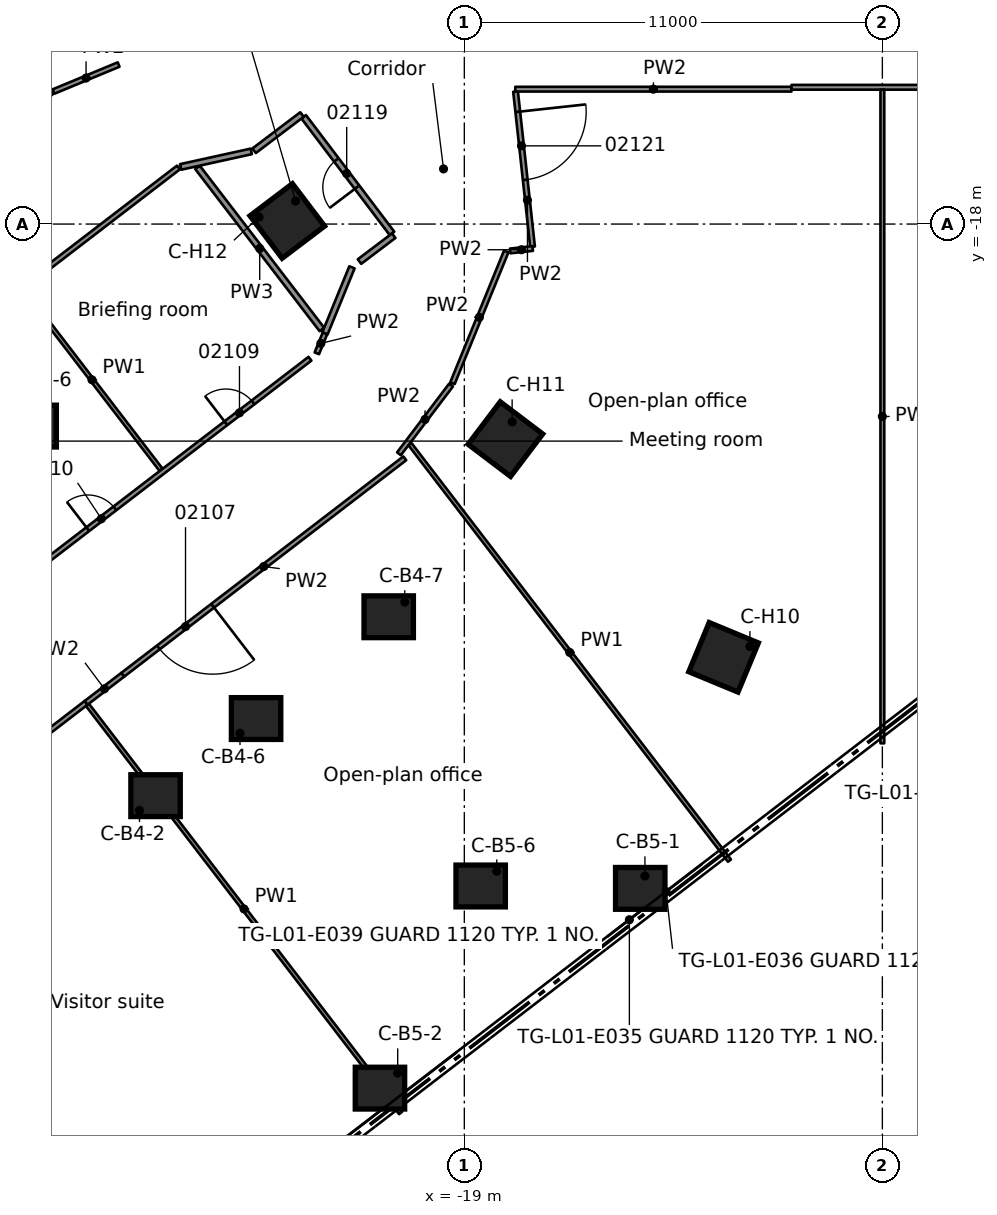
"""IFC4 building model, lengths in metres.
Left out: names, types, materials, properties, quantities, classifications, styles, units other than length and angle.
Written with IfcOpenShell. Run it as: python <this file> out.ifc"""

import sys

from ifc_helpers import new_model, si_unit, direction, frame, frame_2d, origin, origin_2d, place, context, subcontext, project, spatial, rectangle, extrude, element, fill, save


model = new_model("IFC4")
c1 = context("Model", 3, precision=1e-05, world=origin(), true_north=direction((0.0, 1.0)))
c2 = subcontext(c1, "Body", "Model", "MODEL_VIEW")
j1 = project(units=[si_unit("LENGTHUNIT", "METRE"), si_unit("PLANEANGLEUNIT", "RADIAN")], contexts=[c1])
p1 = place(None, origin())
s1 = spatial("IfcSite", under=j1, at=p1, CompositionType="ELEMENT")
p2 = place(p1, origin())
s2 = spatial("IfcBuilding", under=s1, at=p2, CompositionType="ELEMENT")
p3 = place(p2, frame((0.0, 0.0, 10.5)))
s3 = spatial("IfcBuildingStorey", under=s2, at=p3, CompositionType="ELEMENT", Elevation=10.5)
for number, where, z_axis, x_axis in (
    (1, (-30.385, -23.316, -1.0), (0.0, 0.0, 1.0), (0.707, 0.707, 0.0)),
    (2, (-27.125, -33.04, -1.0), (0.0, 0.0, 1.0), (0.707, 0.707, 0.0)),
    (3, (-24.48, -31.011, -1.0), (0.0, 0.0, 1.0), (0.707, 0.707, 0.0)),
):
    element("IfcColumn", number, at=place(p3, frame(where, z_axis=z_axis, x_axis=x_axis)), inside=s3, PredefinedType="COLUMN", context=c2, shape_type="SweptSolid", body=[
        extrude(rectangle(XDim=3.25, YDim=3.25, at=origin_2d()), origin(), (0.0, 0.0, 1.0), 1.0),
    ])
p4 = place(p3, frame((-20.99, -28.333, -1.0), z_axis=(0.0, 0.0, 1.0), x_axis=(0.707106781187, 0.707106781187, 0.0)))
e4 = element("IfcColumn", 4, at=p4, inside=s3, PredefinedType="COLUMN", context=c2, shape_type="SweptSolid", body=[
    extrude(rectangle(XDim=3.4, YDim=3.4, at=origin_2d()), origin(), (0.0, 0.0, 1.0), 1.0),
])
p5 = place(p3, frame((-14.371, -35.48, -1.0), z_axis=(0.0, 0.0, 1.0), x_axis=(0.707106781187, 0.707106781187, 0.0)))
e5 = element("IfcColumn", 5, at=p5, inside=s3, PredefinedType="COLUMN", context=c2, shape_type="SweptSolid", body=[
    extrude(rectangle(XDim=2.95, YDim=2.95, at=origin_2d()), origin(), (0.0, 0.0, 1.0), 1.0),
])
p6 = place(p3, frame((-21.22, -40.736, -1.0), z_axis=(0.0, 0.0, 1.0), x_axis=(0.707106781187, 0.707106781187, 0.0)))
e6 = element("IfcColumn", 6, at=p6, inside=s3, PredefinedType="COLUMN", context=c2, shape_type="SweptSolid", body=[
    extrude(rectangle(XDim=3.4, YDim=3.4, at=origin_2d()), origin(), (0.0, 0.0, 1.0), 1.0),
])
p7 = place(p3, frame((-18.57, -35.417, -1.0), z_axis=(0.0, 0.0, 1.0), x_axis=(0.707106781187, 0.707106781187, 0.0)))
e7 = element("IfcColumn", 7, at=p7, inside=s3, PredefinedType="COLUMN", context=c2, shape_type="SweptSolid", body=[
    extrude(rectangle(XDim=2.95, YDim=2.95, at=origin_2d()), origin(), (0.0, 0.0, 1.0), 1.0),
])
for number, where, z_axis, x_axis in (
    (8, (-12.178, -29.4, -1.0), (0.0, 0.0, 1.0), (0.707, 0.707, 0.0)),
    (9, (-17.919, -23.659, -1.0), (0.0, 0.0, 1.0), (0.707, 0.707, 0.0)),
    (10, (-23.659, -17.919, -1.0), (0.0, 0.0, 1.0), (0.707, 0.707, 0.0)),
    (11, (-29.4, -12.178, -1.0), (0.0, 0.0, 1.0), (0.707, 0.707, 0.0)),
):
    element("IfcColumn", number, at=place(p3, frame(where, z_axis=z_axis, x_axis=x_axis)), inside=s3, PredefinedType="COLUMN", context=c2, shape_type="SweptSolid", body=[
        extrude(rectangle(XDim=3.4, YDim=3.4, at=origin_2d()), origin(), (0.0, 0.0, 1.0), 1.0),
    ])
for number, where, z_axis, x_axis in (
    (12, (-30.385, -23.316, 0.0), (0.0, 0.0, 1.0), (1.0, 0.0, 0.0)),
    (13, (-27.125, -33.04, 0.0), (0.0, 0.0, 1.0), (1.0, 0.0, 0.0)),
    (14, (-24.48, -31.011, 0.0), (0.0, 0.0, 1.0), (1.0, 0.0, 0.0)),
    (15, (-20.99, -28.333, 0.0), (0.0, 0.0, 1.0), (1.0, 0.0, 0.0)),
    (16, (-14.371, -35.48, 0.0), (0.0, 0.0, 1.0), (1.0, 0.0, 0.0)),
    (17, (-21.22, -40.736, 0.0), (0.0, 0.0, 1.0), (1.0, 0.0, 0.0)),
    (18, (-18.57, -35.417, 0.0), (0.0, 0.0, 1.0), (1.0, 0.0, 0.0)),
):
    element("IfcColumn", number, at=place(p3, frame(where, z_axis=z_axis, x_axis=x_axis)), inside=s3, PredefinedType="COLUMN", context=c2, shape_type="SweptSolid", body=[
        extrude(rectangle(XDim=1.3, YDim=1.1, at=origin_2d()), origin(), (0.0, 0.0, 1.0), 5.0),
    ])
for number, where, z_axis, x_axis in (
    (19, (-12.178, -29.4, 0.0), (0.0, 0.0, 1.0), (-0.383, -0.924, 0.0)),
    (20, (-17.919, -23.659, 0.0), (0.0, 0.0, 1.0), (-0.604, -0.797, 0.0)),
    (21, (-23.659, -17.919, 0.0), (0.0, 0.0, 1.0), (-0.797, -0.604, 0.0)),
):
    element("IfcColumn", number, at=place(p3, frame(where, z_axis=z_axis, x_axis=x_axis)), inside=s3, PredefinedType="COLUMN", context=c2, shape_type="SweptSolid", body=[
        extrude(rectangle(XDim=1.4, YDim=1.4, at=origin_2d()), origin(), (0.0, 0.0, 1.0), 5.0),
    ])
p8 = place(p3, frame((-17.652, -14.513, 0.0), z_axis=(0.0, 0.0, 1.0), x_axis=(0.108833050521, -0.994060042007, 0.0)))
e22 = element("IfcWall", 22, at=p8, inside=s3, PredefinedType="PARTITIONING", context=c2, shape_type="SweptSolid", body=[
    extrude(rectangle(XDim=4.107, YDim=0.125, at=frame_2d((2.054, 0.0))), origin(), (0.0, 0.0, 1.0), 4.58),
])
p9 = place(p8, frame((0.538, 0.0, 0.0)))
e23 = element("IfcOpeningElement", 23, at=p9, cuts=e22, PredefinedType="OPENING", context=c2, shape_type="SweptSolid", body=[
    extrude(rectangle(XDim=1.8, YDim=2.1, at=frame_2d((0.9, 1.05))), frame((0.0, 0.073, 0.0), z_axis=(0.0, -1.0, 0.0), x_axis=(1.0, 0.0, 0.0)), (0.0, 0.0, 1.0), 0.145),
])
p10 = place(p3, frame((-20.903, -18.246, 0.0), z_axis=(0.0, 0.0, 1.0), x_axis=(-0.603799066409, 0.797136555054, 0.0)))
e24 = element("IfcWall", 24, at=p10, inside=s3, PredefinedType="PARTITIONING", context=c2, shape_type="SweptSolid", body=[
    extrude(rectangle(XDim=3.849, YDim=0.15, at=frame_2d((1.924, 0.0))), origin(), (0.0, 0.0, 1.0), 4.58),
])
p11 = place(p10, frame((1.525, 0.0, 0.0)))
e25 = element("IfcOpeningElement", 25, at=p11, cuts=e24, PredefinedType="OPENING", context=c2, shape_type="SweptSolid", body=[
    extrude(rectangle(XDim=0.9, YDim=2.1, at=frame_2d((0.45, 1.05))), frame((0.0, 0.085, 0.0), z_axis=(0.0, -1.0, 0.0), x_axis=(1.0, 0.0, 0.0)), (0.0, 0.0, 1.0), 0.17),
])
p12 = place(p3, frame((-35.819, -35.947, 0.0), z_axis=(0.0, 0.0, 1.0), x_axis=(0.608745897366, -0.793365257898, 0.0)))
e26 = element("IfcWall", 26, at=p12, inside=s3, PredefinedType="PARTITIONING", context=c2, shape_type="SweptSolid", body=[
    extrude(rectangle(XDim=13.482, YDim=0.1, at=frame_2d((6.741, 0.0))), origin(), (0.0, 0.0, 1.0), 4.58),
])
p13 = place(p3, frame((-28.917, -30.652, 0.0), z_axis=(0.0, 0.0, 1.0), x_axis=(0.608788953199, -0.793332219478, 0.0)))
e27 = element("IfcWall", 27, at=p13, inside=s3, PredefinedType="PARTITIONING", context=c2, shape_type="SweptSolid", body=[
    extrude(rectangle(XDim=13.535, YDim=0.1, at=frame_2d((6.768, 0.0))), origin(), (0.0, 0.0, 1.0), 4.58),
])
p14 = place(p3, frame((-30.617, -19.729, 0.0), z_axis=(0.0, 0.0, 1.0), x_axis=(0.608902533452, -0.793245047104, 0.0)))
e28 = element("IfcWall", 28, at=p14, inside=s3, PredefinedType="PARTITIONING", context=c2, shape_type="SweptSolid", body=[
    extrude(rectangle(XDim=5.973, YDim=0.1, at=frame_2d((2.986, 0.0))), origin(), (0.0, 0.0, 1.0), 4.58),
])
p15 = place(p3, frame((-26.021, -16.509, 0.0), z_axis=(0.0, 0.0, 1.0), x_axis=(0.608806156611, -0.793319017592, 0.0)))
e29 = element("IfcWall", 29, at=p15, inside=s3, PredefinedType="PARTITIONING", context=c2, shape_type="SweptSolid", body=[
    extrude(rectangle(XDim=5.376, YDim=0.15, at=frame_2d((2.688, 0.0))), origin(), (0.0, 0.0, 1.0), 4.58),
])
p16 = place(p3, frame((-20.431, -23.791, 0.0), z_axis=(0.0, 0.0, 1.0), x_axis=(0.608708319694, -0.793394089678, 0.0)))
e30 = element("IfcWall", 30, at=p16, inside=s3, PredefinedType="PARTITIONING", context=c2, shape_type="SweptSolid", body=[
    extrude(rectangle(XDim=13.813, YDim=0.1, at=frame_2d((6.906, 0.0))), origin(), (0.0, 0.0, 1.0), 4.58),
])
p17 = place(p3, frame((-17.659, -14.451, 0.0), z_axis=(0.0, 0.0, 1.0), x_axis=(1.0, 0.0, 0.0)))
e31 = element("IfcWall", 31, at=p17, inside=s3, PredefinedType="PARTITIONING", context=c2, shape_type="SweptSolid", body=[
    extrude(rectangle(XDim=7.268, YDim=0.125, at=frame_2d((3.634, 0.0))), origin(), (0.0, 0.0, 1.0), 4.58),
])
p18 = place(p3, frame((10.391, -14.401, 0.0), z_axis=(0.0, 0.0, 1.0), x_axis=(-1.0, 0.0, 0.0)))
e32 = element("IfcWall", 32, at=p18, inside=s3, PredefinedType="PARTITIONING", context=c2, shape_type="SweptSolid", body=[
    extrude(rectangle(XDim=20.781, YDim=0.125, at=frame_2d((10.391, 0.0))), origin(), (0.0, 0.0, 1.0), 4.58),
])
p19 = place(p18, frame((13.491, 0.0, 0.0)))
e33 = element("IfcOpeningElement", 33, at=p19, cuts=e32, PredefinedType="OPENING", context=c2, shape_type="SweptSolid", body=[
    extrude(rectangle(XDim=1.8, YDim=2.1, at=frame_2d((0.9, 1.05))), frame((0.0, 0.073, 0.0), z_axis=(0.0, -1.0, 0.0), x_axis=(1.0, 0.0, 0.0)), (0.0, 0.0, 1.0), 0.145),
])
p20 = place(p18, frame((5.491, 0.0, 0.0)))
e34 = element("IfcOpeningElement", 34, at=p20, cuts=e32, PredefinedType="OPENING", context=c2, shape_type="SweptSolid", body=[
    extrude(rectangle(XDim=1.8, YDim=2.1, at=frame_2d((0.9, 1.05))), frame((0.0, 0.073, 0.0), z_axis=(0.0, -1.0, 0.0), x_axis=(1.0, 0.0, 0.0)), (0.0, 0.0, 1.0), 0.145),
])
p21 = place(p3, frame((-17.793, -18.708, 0.0), z_axis=(0.0, 0.0, 1.0), x_axis=(0.994037722998, 0.109036715182, 0.0)))
e35 = element("IfcWall", 35, at=p21, inside=s3, PredefinedType="PARTITIONING", context=c2, shape_type="SweptSolid", body=[
    extrude(rectangle(XDim=0.596, YDim=0.125, at=frame_2d((0.298, 0.0))), origin(), (0.0, 0.0, 1.0), 4.58),
])
p22 = place(p3, frame((-26.464, -16.497, 0.0), z_axis=(0.0, 0.0, 1.0), x_axis=(0.976601904513, 0.215055155954, 0.0)))
e36 = element("IfcWall", 36, at=p22, inside=s3, PredefinedType="PARTITIONING", context=c2, shape_type="SweptSolid", body=[
    extrude(rectangle(XDim=1.903, YDim=0.15, at=frame_2d((0.951, 0.0))), origin(), (0.0, 0.0, 1.0), 4.58),
])
p23 = place(p3, frame((-29.81, -14.513, 0.0), z_axis=(0.0, 0.0, 1.0), x_axis=(0.923811400228, 0.382847876851, 0.0)))
e37 = element("IfcWall", 37, at=p23, inside=s3, PredefinedType="PARTITIONING", context=c2, shape_type="SweptSolid", body=[
    extrude(rectangle(XDim=1.854, YDim=0.125, at=frame_2d((0.927, 0.0))), origin(), (0.0, 0.0, 1.0), 4.58),
])
p24 = place(p3, frame((-21.758, -18.987, 0.0), z_axis=(0.0, 0.0, 1.0), x_axis=(0.797423261737, 0.603420368931, 0.0)))
e38 = element("IfcWall", 38, at=p24, inside=s3, PredefinedType="PARTITIONING", context=c2, shape_type="SweptSolid", body=[
    extrude(rectangle(XDim=1.129, YDim=0.15, at=frame_2d((0.564, 0.0))), origin(), (0.0, 0.0, 1.0), 4.58),
])
p25 = place(p3, frame((-24.532, -16.072, 0.0), z_axis=(0.0, 0.0, 1.0), x_axis=(0.797229566058, 0.603676253469, 0.0)))
e39 = element("IfcWall", 39, at=p25, inside=s3, PredefinedType="PARTITIONING", context=c2, shape_type="SweptSolid", body=[
    extrude(rectangle(XDim=1.581, YDim=0.15, at=frame_2d((0.79, 0.0))), origin(), (0.0, 0.0, 1.0), 4.58),
])
p26 = place(p3, frame((-28.955, -30.6, 0.0), z_axis=(0.0, 0.0, 1.0), x_axis=(0.793590253862, 0.608452552772, 0.0)))
e40 = element("IfcWall", 40, at=p26, inside=s3, PredefinedType="PARTITIONING", context=c2, shape_type="SweptSolid", body=[
    extrude(rectangle(XDim=1.22, YDim=0.125, at=frame_2d((0.61, 0.0))), origin(), (0.0, 0.0, 1.0), 4.58),
])
p27 = place(p3, frame((-28.955, -30.6, 0.0), z_axis=(0.0, 0.0, 1.0), x_axis=(-0.793294727074, -0.608837807627, 0.0)))
e41 = element("IfcWall", 41, at=p27, inside=s3, PredefinedType="PARTITIONING", context=c2, shape_type="SweptSolid", body=[
    extrude(rectangle(XDim=13.9, YDim=0.125, at=frame_2d((6.95, 0.0))), origin(), (0.0, 0.0, 1.0), 4.58),
])
p28 = place(p27, frame((3.851, 0.0, 0.0)))
e42 = element("IfcOpeningElement", 42, at=p28, cuts=e41, PredefinedType="OPENING", context=c2, shape_type="SweptSolid", body=[
    extrude(rectangle(XDim=0.9, YDim=2.1, at=frame_2d((0.45, 1.05))), frame((0.0, 0.073, 0.0), z_axis=(0.0, -1.0, 0.0), x_axis=(1.0, 0.0, 0.0)), (0.0, 0.0, 1.0), 0.145),
])
p29 = place(p27, frame((10.801, 0.0, 0.0)))
e43 = element("IfcOpeningElement", 43, at=p29, cuts=e41, PredefinedType="OPENING", context=c2, shape_type="SweptSolid", body=[
    extrude(rectangle(XDim=0.9, YDim=2.1, at=frame_2d((0.45, 1.05))), frame((0.0, 0.073, 0.0), z_axis=(0.0, -1.0, 0.0), x_axis=(1.0, 0.0, 0.0)), (0.0, 0.0, 1.0), 0.145),
])
p30 = place(p3, frame((-20.567, -24.164, 0.0), z_axis=(0.0, 0.0, 1.0), x_axis=(-0.793345387212, -0.608771793523, 0.0)))
e44 = element("IfcWall", 44, at=p30, inside=s3, PredefinedType="PARTITIONING", context=c2, shape_type="SweptSolid", body=[
    extrude(rectangle(XDim=9.353, YDim=0.125, at=frame_2d((4.677, 0.0))), origin(), (0.0, 0.0, 1.0), 4.58),
])
p31 = place(p30, frame((6.373, 0.0, 0.0)))
e45 = element("IfcOpeningElement", 45, at=p31, cuts=e44, PredefinedType="OPENING", context=c2, shape_type="SweptSolid", body=[
    extrude(rectangle(XDim=1.8, YDim=2.1, at=frame_2d((0.9, 1.05))), frame((0.0, 0.073, 0.0), z_axis=(0.0, -1.0, 0.0), x_axis=(1.0, 0.0, 0.0)), (0.0, 0.0, 1.0), 0.145),
])
p32 = place(p3, frame((-39.556, -34.196, 0.0), z_axis=(0.0, 0.0, 1.0), x_axis=(0.793448872505, 0.608636908773, 0.0)))
e46 = element("IfcWall", 46, at=p32, inside=s3, PredefinedType="PARTITIONING", context=c2, shape_type="SweptSolid", body=[
    extrude(rectangle(XDim=20.788, YDim=0.125, at=frame_2d((10.394, 0.0))), origin(), (0.0, 0.0, 1.0), 4.58),
])
p33 = place(p32, frame((18.0, 0.0, 0.0)))
e47 = element("IfcOpeningElement", 47, at=p33, cuts=e46, PredefinedType="OPENING", context=c2, shape_type="SweptSolid", body=[
    extrude(rectangle(XDim=0.9, YDim=2.1, at=frame_2d((0.45, 1.05))), frame((0.0, 0.073, 0.0), z_axis=(0.0, -1.0, 0.0), x_axis=(1.0, 0.0, 0.0)), (0.0, 0.0, 1.0), 0.145),
])
p34 = place(p32, frame((13.419, 0.0, 0.0)))
e48 = element("IfcOpeningElement", 48, at=p34, cuts=e46, PredefinedType="OPENING", context=c2, shape_type="SweptSolid", body=[
    extrude(rectangle(XDim=0.9, YDim=2.1, at=frame_2d((0.45, 1.05))), frame((0.0, 0.073, 0.0), z_axis=(0.0, -1.0, 0.0), x_axis=(1.0, 0.0, 0.0)), (0.0, 0.0, 1.0), 0.145),
])
p35 = place(p32, frame((5.749, 0.0, 0.0)))
e49 = element("IfcOpeningElement", 49, at=p35, cuts=e46, PredefinedType="OPENING", context=c2, shape_type="SweptSolid", body=[
    extrude(rectangle(XDim=0.9, YDim=2.1, at=frame_2d((0.45, 1.05))), frame((0.0, 0.073, 0.0), z_axis=(0.0, -1.0, 0.0), x_axis=(1.0, 0.0, 0.0)), (0.0, 0.0, 1.0), 0.145),
])
p36 = place(p3, frame((-43.269, -29.358, 0.0), z_axis=(0.0, 0.0, 1.0), x_axis=(0.793439885471, 0.608648624531, 0.0)))
e50 = element("IfcWall", 50, at=p36, inside=s3, PredefinedType="PARTITIONING", context=c2, shape_type="SweptSolid", body=[
    extrude(rectangle(XDim=21.106, YDim=0.125, at=frame_2d((10.553, 0.0))), origin(), (0.0, 0.0, 1.0), 4.58),
])
p37 = place(p3, frame((-36.084, -19.305, 0.0), z_axis=(0.0, 0.0, 1.0), x_axis=(0.793472416576, 0.60860621434, 0.0)))
e51 = element("IfcWall", 51, at=p37, inside=s3, PredefinedType="PARTITIONING", context=c2, shape_type="SweptSolid", body=[
    extrude(rectangle(XDim=7.834, YDim=0.125, at=frame_2d((3.917, 0.0))), origin(), (0.0, 0.0, 1.0), 4.58),
])
p38 = place(p37, frame((1.6, 0.0, 0.0)))
e52 = element("IfcOpeningElement", 52, at=p38, cuts=e51, PredefinedType="OPENING", context=c2, shape_type="SweptSolid", body=[
    extrude(rectangle(XDim=0.9, YDim=2.1, at=frame_2d((0.45, 1.05))), frame((0.0, 0.073, 0.0), z_axis=(0.0, -1.0, 0.0), x_axis=(1.0, 0.0, 0.0)), (0.0, 0.0, 1.0), 0.145),
])
p39 = place(p3, frame((-19.35, -22.237, 0.0), z_axis=(0.0, 0.0, 1.0), x_axis=(-0.603936432713, -0.797032486943, 0.0)))
e53 = element("IfcWall", 53, at=p39, inside=s3, PredefinedType="PARTITIONING", context=c2, shape_type="SweptSolid", body=[
    extrude(rectangle(XDim=2.268, YDim=0.125, at=frame_2d((1.134, 0.0))), origin(), (0.0, 0.0, 1.0), 4.58),
])
p40 = place(p3, frame((-19.312, -22.187, 0.0), z_axis=(0.0, 0.0, 1.0), x_axis=(0.377878748859, 0.925855091881, 0.0)))
e54 = element("IfcWall", 54, at=p40, inside=s3, PredefinedType="PARTITIONING", context=c2, shape_type="SweptSolid", body=[
    extrude(rectangle(XDim=3.745, YDim=0.125, at=frame_2d((1.872, 0.0))), origin(), (0.0, 0.0, 1.0), 4.58),
])
p41 = place(p3, frame((-22.668, -20.878, 0.0), z_axis=(0.0, 0.0, 1.0), x_axis=(0.378415254767, 0.925635940832, 0.0)))
e55 = element("IfcWall", 55, at=p41, inside=s3, PredefinedType="PARTITIONING", context=c2, shape_type="SweptSolid", body=[
    extrude(rectangle(XDim=1.879, YDim=0.15, at=frame_2d((0.939, 0.0))), origin(), (0.0, 0.0, 1.0), 4.58),
])
p42 = place(p3, frame((-22.881, -21.401, 0.0), z_axis=(0.0, 0.0, 1.0), x_axis=(0.377420478288, 0.926041998275, 0.0)))
e56 = element("IfcWall", 56, at=p42, inside=s3, PredefinedType="PARTITIONING", context=c2, shape_type="SweptSolid", body=[
    extrude(rectangle(XDim=0.565, YDim=0.125, at=frame_2d((0.282, 0.0))), origin(), (0.0, 0.0, 1.0), 4.58),
])
p43 = place(p3, frame((-8.0, -31.663, 0.0), z_axis=(0.0, 0.0, 1.0), x_axis=(0.0, 1.0, 0.0)))
e57 = element("IfcWall", 57, at=p43, inside=s3, PredefinedType="PARTITIONING", context=c2, shape_type="SweptSolid", body=[
    extrude(rectangle(XDim=17.2, YDim=0.1, at=frame_2d((8.6, 0.0))), origin(), (0.0, 0.0, 1.0), 4.58),
])
p44 = place(p31, origin())
e58 = element("IfcDoor", 58, at=p44, inside=s3, OperationType="DOUBLE_DOOR_SINGLE_SWING", PredefinedType="DOOR", context=c2, shape_type="SweptSolid", body=[
    extrude(rectangle(XDim=1.8, YDim=2.1, at=frame_2d((0.9, 1.05))), frame((0.0, 0.025, 0.0), z_axis=(0.0, -1.0, 0.0), x_axis=(1.0, 0.0, 0.0)), (0.0, 0.0, 1.0), 0.05),
])
fill(e45, e58)
p45 = place(p33, origin())
e59 = element("IfcDoor", 59, at=p45, inside=s3, OperationType="SINGLE_SWING_RIGHT", PredefinedType="DOOR", context=c2, shape_type="SweptSolid", body=[
    extrude(rectangle(XDim=0.9, YDim=2.1, at=frame_2d((0.45, 1.05))), frame((0.0, 0.025, 0.0), z_axis=(0.0, -1.0, 0.0), x_axis=(1.0, 0.0, 0.0)), (0.0, 0.0, 1.0), 0.05),
])
fill(e47, e59)
p46 = place(p34, origin())
e60 = element("IfcDoor", 60, at=p46, inside=s3, OperationType="SINGLE_SWING_RIGHT", PredefinedType="DOOR", context=c2, shape_type="SweptSolid", body=[
    extrude(rectangle(XDim=0.9, YDim=2.1, at=frame_2d((0.45, 1.05))), frame((0.0, 0.025, 0.0), z_axis=(0.0, -1.0, 0.0), x_axis=(1.0, 0.0, 0.0)), (0.0, 0.0, 1.0), 0.05),
])
fill(e48, e60)
p47 = place(p11, origin())
e61 = element("IfcDoor", 61, at=p47, inside=s3, OperationType="SINGLE_SWING_RIGHT", PredefinedType="DOOR", context=c2, shape_type="SweptSolid", body=[
    extrude(rectangle(XDim=0.9, YDim=2.1, at=frame_2d((0.45, 1.05))), frame((0.0, 0.025, 0.0), z_axis=(0.0, -1.0, 0.0), x_axis=(1.0, 0.0, 0.0)), (0.0, 0.0, 1.0), 0.05),
])
fill(e25, e61)
p48 = place(p9, origin())
e62 = element("IfcDoor", 62, at=p48, inside=s3, OperationType="DOUBLE_DOOR_SINGLE_SWING", PredefinedType="DOOR", context=c2, shape_type="SweptSolid", body=[
    extrude(rectangle(XDim=1.8, YDim=2.1, at=frame_2d((0.9, 1.05))), frame((0.0, 0.025, 0.0), z_axis=(0.0, -1.0, 0.0), x_axis=(1.0, 0.0, 0.0)), (0.0, 0.0, 1.0), 0.05),
])
fill(e23, e62)
save(model, sys.argv[1])
